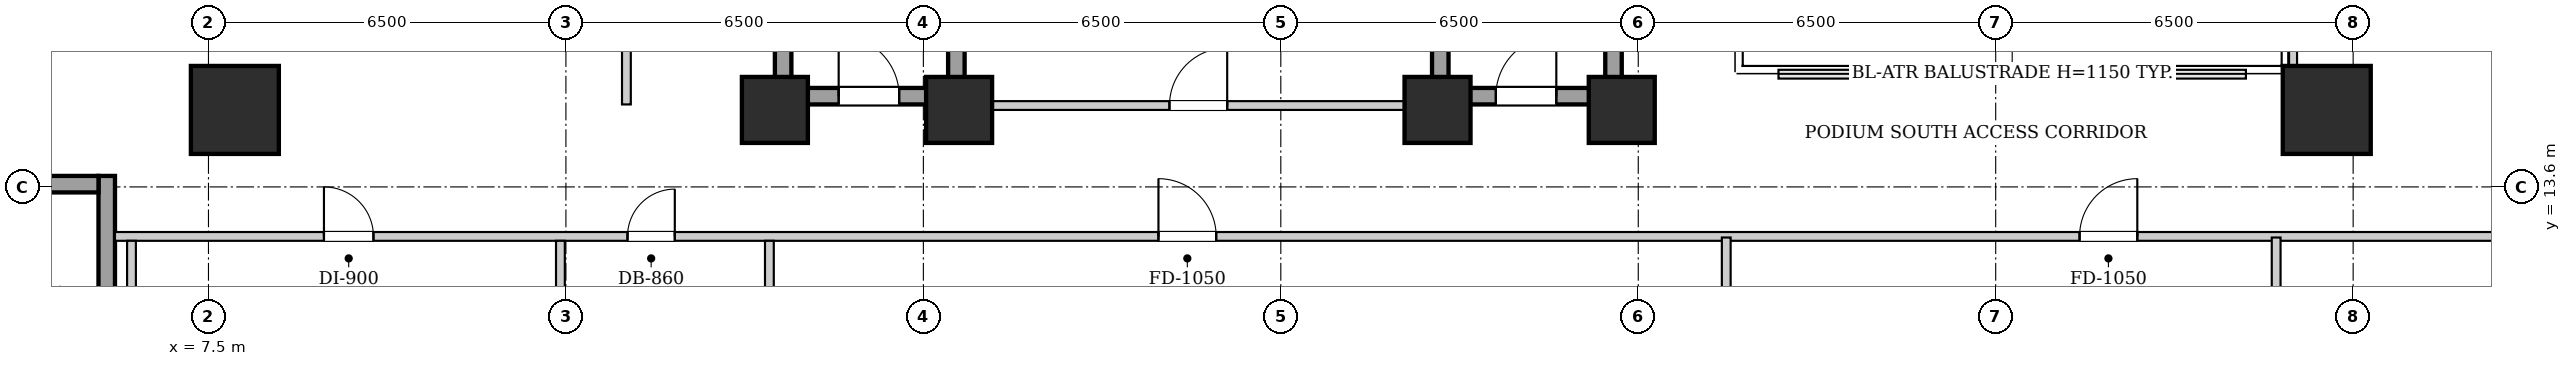
"""IFC4 building model, lengths in metres.
Left out: names, types, materials, properties, quantities, classifications, styles, units other than length and angle.
Written with IfcOpenShell. Run it as: python <this file> out.ifc"""

import sys

from ifc_helpers import new_model, si_unit, direction, frame, frame_2d, origin, origin_2d, place, context, subcontext, project, spatial, rectangle, extrude, element, fill, save


model = new_model("IFC4")
c1 = context("Model", 3, precision=1e-05, world=origin(), true_north=direction((0.0, 1.0)))
c2 = subcontext(c1, "Body", "Model", "MODEL_VIEW")
j1 = project(units=[si_unit("LENGTHUNIT", "METRE"), si_unit("PLANEANGLEUNIT", "RADIAN")], contexts=[c1])
p1 = place(None, origin())
s1 = spatial("IfcSite", under=j1, at=p1, CompositionType="ELEMENT")
p2 = place(p1, origin())
s2 = spatial("IfcBuilding", under=s1, at=p2, CompositionType="ELEMENT")
p3 = place(p2, frame((0.0, 0.0, 11.2)))
s3 = spatial("IfcBuildingStorey", under=s2, at=p3, CompositionType="ELEMENT", Elevation=11.2)
for number, where, z_axis, x_axis in (
    (1, (7.98, 15.0, 0.0), (0.0, 0.0, 1.0), (1.0, 0.0, 0.0)),
    (2, (46.02, 15.0, 0.0), (0.0, 0.0, 1.0), (1.0, 0.0, 0.0)),
):
    element("IfcColumn", number, at=place(p3, frame(where, z_axis=z_axis, x_axis=x_axis)), inside=s3, PredefinedType="COLUMN", context=c2, shape_type="SweptSolid", body=[
        extrude(rectangle(XDim=1.6, YDim=1.6, at=origin_2d()), origin(), (0.0, 0.0, 1.0), 4.8),
    ])
for number, where, z_axis, x_axis in (
    (3, (17.8, 15.0, 0.0), (0.0, 0.0, 1.0), (1.0, 0.0, 0.0)),
    (4, (21.15, 15.0, 0.0), (0.0, 0.0, 1.0), (1.0, 0.0, 0.0)),
    (5, (29.85, 15.0, 0.0), (0.0, 0.0, 1.0), (1.0, 0.0, 0.0)),
    (6, (33.2, 15.0, 0.0), (0.0, 0.0, 1.0), (1.0, 0.0, 0.0)),
):
    element("IfcColumn", number, at=place(p3, frame(where, z_axis=z_axis, x_axis=x_axis)), inside=s3, PredefinedType="COLUMN", context=c2, shape_type="SweptSolid", body=[
        extrude(rectangle(XDim=1.2, YDim=1.2, at=origin_2d()), origin(), (0.0, 0.0, 1.0), 4.8),
    ])
for number, where, z_axis, x_axis in (
    (7, (17.95, 15.1, 0.0), (0.0, 0.0, 1.0), (0.0, 1.0, 0.0)),
    (8, (21.1, 15.1, 0.0), (0.0, 0.0, 1.0), (0.0, 1.0, 0.0)),
):
    element("IfcWall", number, at=place(p3, frame(where, z_axis=z_axis, x_axis=x_axis)), inside=s3, PredefinedType="SHEAR", context=c2, shape_type="SweptSolid", body=[
        extrude(rectangle(XDim=9.0, YDim=0.3, at=frame_2d((4.5, 0.0))), origin(), (0.0, 0.0, 1.0), 4.48),
    ])
p4 = place(p3, frame((18.1, 15.25, 0.0), z_axis=(0.0, 0.0, 1.0), x_axis=(1.0, 0.0, 0.0)))
e9 = element("IfcWall", 9, at=p4, inside=s3, PredefinedType="SHEAR", context=c2, shape_type="SweptSolid", body=[
    extrude(rectangle(XDim=2.85, YDim=0.3, at=frame_2d((1.425, 0.0))), origin(), (0.0, 0.0, 1.0), 4.48),
])
p5 = place(p4, frame((0.86, 0.0, 0.0)))
e10 = element("IfcOpeningElement", 10, at=p5, cuts=e9, PredefinedType="OPENING", context=c2, shape_type="SweptSolid", body=[
    extrude(rectangle(XDim=1.1, YDim=2.05, at=frame_2d((0.55, 1.025))), frame((0.0, 0.16, 0.0), z_axis=(0.0, -1.0, 0.0), x_axis=(1.0, 0.0, 0.0)), (0.0, 0.0, 1.0), 0.32),
])
for number, where, z_axis, x_axis in (
    (11, (29.9, 15.1, 0.0), (0.0, 0.0, 1.0), (0.0, 1.0, 0.0)),
    (12, (33.05, 15.1, 0.0), (0.0, 0.0, 1.0), (0.0, 1.0, 0.0)),
):
    element("IfcWall", number, at=place(p3, frame(where, z_axis=z_axis, x_axis=x_axis)), inside=s3, PredefinedType="SHEAR", context=c2, shape_type="SweptSolid", body=[
        extrude(rectangle(XDim=9.0, YDim=0.3, at=frame_2d((4.5, 0.0))), origin(), (0.0, 0.0, 1.0), 4.48),
    ])
p6 = place(p3, frame((30.05, 15.25, 0.0), z_axis=(0.0, 0.0, 1.0), x_axis=(1.0, 0.0, 0.0)))
e13 = element("IfcWall", 13, at=p6, inside=s3, PredefinedType="SHEAR", context=c2, shape_type="SweptSolid", body=[
    extrude(rectangle(XDim=2.85, YDim=0.3, at=frame_2d((1.425, 0.0))), origin(), (0.0, 0.0, 1.0), 4.48),
])
p7 = place(p6, frame((0.86, 0.0, 0.0)))
e14 = element("IfcOpeningElement", 14, at=p7, cuts=e13, PredefinedType="OPENING", context=c2, shape_type="SweptSolid", body=[
    extrude(rectangle(XDim=1.1, YDim=2.05, at=frame_2d((0.55, 1.025))), frame((0.0, 0.16, 0.0), z_axis=(0.0, -1.0, 0.0), x_axis=(1.0, 0.0, 0.0)), (0.0, 0.0, 1.0), 0.32),
])
p8 = place(p3, frame((5.65, 4.0, 0.0), z_axis=(0.0, 0.0, 1.0), x_axis=(0.0, 1.0, 0.0)))
e15 = element("IfcWall", 15, at=p8, inside=s3, PredefinedType="SHEAR", context=c2, shape_type="SweptSolid", body=[
    extrude(rectangle(XDim=9.8, YDim=0.3, at=frame_2d((4.9, 0.0))), origin(), (0.0, 0.0, 1.0), 4.48),
])
p9 = place(p3, frame((2.35, 13.65, 0.0), z_axis=(0.0, 0.0, 1.0), x_axis=(1.0, 0.0, 0.0)))
e16 = element("IfcWall", 16, at=p9, inside=s3, PredefinedType="SHEAR", context=c2, shape_type="SweptSolid", body=[
    extrude(rectangle(XDim=3.15, YDim=0.3, at=frame_2d((1.575, 0.0))), origin(), (0.0, 0.0, 1.0), 4.48),
])
p10 = place(p3, frame((21.25, 15.08, 0.0), z_axis=(0.0, 0.0, 1.0), x_axis=(1.0, 0.0, 0.0)))
e17 = element("IfcWall", 17, at=p10, inside=s3, PredefinedType="PARTITIONING", context=c2, shape_type="SweptSolid", body=[
    extrude(rectangle(XDim=8.5, YDim=0.16, at=frame_2d((4.25, 0.0))), origin(), (0.0, 0.0, 1.0), 4.48),
])
p11 = place(p10, frame((3.725, 0.0, 0.0)))
e18 = element("IfcOpeningElement", 18, at=p11, cuts=e17, PredefinedType="OPENING", context=c2, shape_type="SweptSolid", body=[
    extrude(rectangle(XDim=1.05, YDim=2.05, at=frame_2d((0.525, 1.025))), frame((0.0, 0.09, 0.0), z_axis=(0.0, -1.0, 0.0), x_axis=(1.0, 0.0, 0.0)), (0.0, 0.0, 1.0), 0.18),
])
p12 = place(p3, frame((5.8, 12.7, 0.0), z_axis=(0.0, 0.0, 1.0), x_axis=(1.0, 0.0, 0.0)))
e19 = element("IfcWall", 19, at=p12, inside=s3, PredefinedType="PARTITIONING", context=c2, shape_type="SweptSolid", body=[
    extrude(rectangle(XDim=47.92, YDim=0.16, at=frame_2d((23.96, 0.0))), origin(), (0.0, 0.0, 1.0), 4.48),
])
p13 = place(p12, frame((3.8, 0.0, 0.0)))
e20 = element("IfcOpeningElement", 20, at=p13, cuts=e19, PredefinedType="OPENING", context=c2, shape_type="SweptSolid", body=[
    extrude(rectangle(XDim=0.9, YDim=2.05, at=frame_2d((0.45, 1.025))), frame((0.0, 0.09, 0.0), z_axis=(0.0, -1.0, 0.0), x_axis=(1.0, 0.0, 0.0)), (0.0, 0.0, 1.0), 0.18),
])
p14 = place(p12, frame((9.32, 0.0, 0.0)))
e21 = element("IfcOpeningElement", 21, at=p14, cuts=e19, PredefinedType="OPENING", context=c2, shape_type="SweptSolid", body=[
    extrude(rectangle(XDim=0.86, YDim=2.05, at=frame_2d((0.43, 1.025))), frame((0.0, 0.09, 0.0), z_axis=(0.0, -1.0, 0.0), x_axis=(1.0, 0.0, 0.0)), (0.0, 0.0, 1.0), 0.18),
])
p15 = place(p12, frame((18.975, 0.0, 0.0)))
e22 = element("IfcOpeningElement", 22, at=p15, cuts=e19, PredefinedType="OPENING", context=c2, shape_type="SweptSolid", body=[
    extrude(rectangle(XDim=1.05, YDim=2.05, at=frame_2d((0.525, 1.025))), frame((0.0, 0.09, 0.0), z_axis=(0.0, -1.0, 0.0), x_axis=(1.0, 0.0, 0.0)), (0.0, 0.0, 1.0), 0.18),
])
p16 = place(p12, frame((35.725, 0.0, 0.0)))
e23 = element("IfcOpeningElement", 23, at=p16, cuts=e19, PredefinedType="OPENING", context=c2, shape_type="SweptSolid", body=[
    extrude(rectangle(XDim=1.05, YDim=2.05, at=frame_2d((0.525, 1.025))), frame((0.0, 0.09, 0.0), z_axis=(0.0, -1.0, 0.0), x_axis=(1.0, 0.0, 0.0)), (0.0, 0.0, 1.0), 0.18),
])
p17 = place(p3, frame((6.1, 6.1, 0.0), z_axis=(0.0, 0.0, 1.0), x_axis=(0.0, 1.0, 0.0)))
e24 = element("IfcWall", 24, at=p17, inside=s3, PredefinedType="PARTITIONING", context=c2, shape_type="SweptSolid", body=[
    extrude(rectangle(XDim=6.52, YDim=0.16, at=frame_2d((3.26, 0.0))), origin(), (0.0, 0.0, 1.0), 4.48),
])
p18 = place(p3, frame((13.9, 6.18, 0.0), z_axis=(0.0, 0.0, 1.0), x_axis=(0.0, 1.0, 0.0)))
e25 = element("IfcWall", 25, at=p18, inside=s3, PredefinedType="PARTITIONING", context=c2, shape_type="SweptSolid", body=[
    extrude(rectangle(XDim=6.44, YDim=0.16, at=frame_2d((3.22, 0.0))), origin(), (0.0, 0.0, 1.0), 4.48),
])
p19 = place(p3, frame((17.7, 0.6, 0.0), z_axis=(0.0, 0.0, 1.0), x_axis=(0.0, 1.0, 0.0)))
e26 = element("IfcWall", 26, at=p19, inside=s3, PredefinedType="PARTITIONING", context=c2, shape_type="SweptSolid", body=[
    extrude(rectangle(XDim=12.02, YDim=0.16, at=frame_2d((6.01, 0.0))), origin(), (0.0, 0.0, 1.0), 3.565),
])
p20 = place(p3, frame((15.1, 15.1, 0.0), z_axis=(0.0, 0.0, 1.0), x_axis=(0.0, 1.0, 0.0)))
e27 = element("IfcWall", 27, at=p20, inside=s3, PredefinedType="PARTITIONING", context=c2, shape_type="SweptSolid", body=[
    extrude(rectangle(XDim=13.8, YDim=0.16, at=frame_2d((6.9, 0.0))), origin(), (0.0, 0.0, 1.0), 4.48),
])
p21 = place(p20, frame((6.475, 0.0, 0.0)))
e28 = element("IfcOpeningElement", 28, at=p21, cuts=e27, PredefinedType="OPENING", context=c2, shape_type="SweptSolid", body=[
    extrude(rectangle(XDim=1.05, YDim=2.05, at=frame_2d((0.525, 1.025))), frame((0.0, 0.09, 0.0), z_axis=(0.0, -1.0, 0.0), x_axis=(1.0, 0.0, 0.0)), (0.0, 0.0, 1.0), 0.18),
])
p22 = place(p3, frame((45.4, 15.1, 0.0), z_axis=(0.0, 0.0, 1.0), x_axis=(0.0, 1.0, 0.0)))
e29 = element("IfcWall", 29, at=p22, inside=s3, PredefinedType="PARTITIONING", context=c2, shape_type="SweptSolid", body=[
    extrude(rectangle(XDim=13.78, YDim=0.16, at=frame_2d((6.89, 0.0))), origin(), (0.0, 0.0, 1.0), 4.48),
])
p23 = place(p3, frame((35.1, 0.28, 0.0), z_axis=(0.0, 0.0, 1.0), x_axis=(0.0, 1.0, 0.0)))
e30 = element("IfcWall", 30, at=p23, inside=s3, PredefinedType="PARTITIONING", context=c2, shape_type="SweptSolid", body=[
    extrude(rectangle(XDim=12.4, YDim=0.16, at=frame_2d((6.2, 0.0))), origin(), (0.0, 0.0, 1.0), 4.48),
])
p24 = place(p23, frame((4.55, 0.0, 0.0)))
e31 = element("IfcOpeningElement", 31, at=p24, cuts=e30, PredefinedType="OPENING", context=c2, shape_type="SweptSolid", body=[
    extrude(rectangle(XDim=0.9, YDim=2.05, at=frame_2d((0.45, 1.025))), frame((0.0, 0.09, 0.0), z_axis=(0.0, -1.0, 0.0), x_axis=(1.0, 0.0, 0.0)), (0.0, 0.0, 1.0), 0.18),
])
p25 = place(p3, frame((45.1, 0.28, 0.0), z_axis=(0.0, 0.0, 1.0), x_axis=(0.0, 1.0, 0.0)))
e32 = element("IfcWall", 32, at=p25, inside=s3, PredefinedType="PARTITIONING", context=c2, shape_type="SweptSolid", body=[
    extrude(rectangle(XDim=12.4, YDim=0.16, at=frame_2d((6.2, 0.0))), origin(), (0.0, 0.0, 1.0), 4.48),
])
p26 = place(p25, frame((4.55, 0.0, 0.0)))
e33 = element("IfcOpeningElement", 33, at=p26, cuts=e32, PredefinedType="OPENING", context=c2, shape_type="SweptSolid", body=[
    extrude(rectangle(XDim=0.9, YDim=2.05, at=frame_2d((0.45, 1.025))), frame((0.0, 0.09, 0.0), z_axis=(0.0, -1.0, 0.0), x_axis=(1.0, 0.0, 0.0)), (0.0, 0.0, 1.0), 0.18),
])
p27 = place(p5, origin())
e34 = element("IfcDoor", 34, at=p27, inside=s3, OperationType="SINGLE_SWING_LEFT", PredefinedType="DOOR", context=c2, shape_type="SweptSolid", body=[
    extrude(rectangle(XDim=1.1, YDim=2.05, at=frame_2d((0.55, 1.025))), frame((0.0, 0.025, 0.0), z_axis=(0.0, -1.0, 0.0), x_axis=(1.0, 0.0, 0.0)), (0.0, 0.0, 1.0), 0.05),
])
fill(e10, e34)
p28 = place(p7, origin())
e35 = element("IfcDoor", 35, at=p28, inside=s3, OperationType="SINGLE_SWING_RIGHT", PredefinedType="DOOR", context=c2, shape_type="SweptSolid", body=[
    extrude(rectangle(XDim=1.1, YDim=2.05, at=frame_2d((0.55, 1.025))), frame((0.0, 0.025, 0.0), z_axis=(0.0, -1.0, 0.0), x_axis=(1.0, 0.0, 0.0)), (0.0, 0.0, 1.0), 0.05),
])
fill(e14, e35)
p29 = place(p11, origin())
e36 = element("IfcDoor", 36, at=p29, inside=s3, OperationType="SINGLE_SWING_RIGHT", PredefinedType="DOOR", context=c2, shape_type="SweptSolid", body=[
    extrude(rectangle(XDim=1.05, YDim=2.05, at=frame_2d((0.525, 1.025))), frame((0.0, 0.025, 0.0), z_axis=(0.0, -1.0, 0.0), x_axis=(1.0, 0.0, 0.0)), (0.0, 0.0, 1.0), 0.05),
])
fill(e18, e36)
p30 = place(p13, origin())
e37 = element("IfcDoor", 37, at=p30, inside=s3, OperationType="SINGLE_SWING_LEFT", PredefinedType="DOOR", context=c2, shape_type="SweptSolid", body=[
    extrude(rectangle(XDim=0.9, YDim=2.05, at=frame_2d((0.45, 1.025))), frame((0.0, 0.025, 0.0), z_axis=(0.0, -1.0, 0.0), x_axis=(1.0, 0.0, 0.0)), (0.0, 0.0, 1.0), 0.05),
])
fill(e20, e37)
p31 = place(p14, origin())
e38 = element("IfcDoor", 38, at=p31, inside=s3, OperationType="SINGLE_SWING_RIGHT", PredefinedType="DOOR", context=c2, shape_type="SweptSolid", body=[
    extrude(rectangle(XDim=0.86, YDim=2.05, at=frame_2d((0.43, 1.025))), frame((0.0, 0.025, 0.0), z_axis=(0.0, -1.0, 0.0), x_axis=(1.0, 0.0, 0.0)), (0.0, 0.0, 1.0), 0.05),
])
fill(e21, e38)
p32 = place(p15, origin())
e39 = element("IfcDoor", 39, at=p32, inside=s3, OperationType="SINGLE_SWING_LEFT", PredefinedType="DOOR", context=c2, shape_type="SweptSolid", body=[
    extrude(rectangle(XDim=1.05, YDim=2.05, at=frame_2d((0.525, 1.025))), frame((0.0, 0.025, 0.0), z_axis=(0.0, -1.0, 0.0), x_axis=(1.0, 0.0, 0.0)), (0.0, 0.0, 1.0), 0.05),
])
fill(e22, e39)
p33 = place(p16, origin())
e40 = element("IfcDoor", 40, at=p33, inside=s3, OperationType="SINGLE_SWING_RIGHT", PredefinedType="DOOR", context=c2, shape_type="SweptSolid", body=[
    extrude(rectangle(XDim=1.05, YDim=2.05, at=frame_2d((0.525, 1.025))), frame((0.0, 0.025, 0.0), z_axis=(0.0, -1.0, 0.0), x_axis=(1.0, 0.0, 0.0)), (0.0, 0.0, 1.0), 0.05),
])
fill(e23, e40)
save(model, sys.argv[1])
